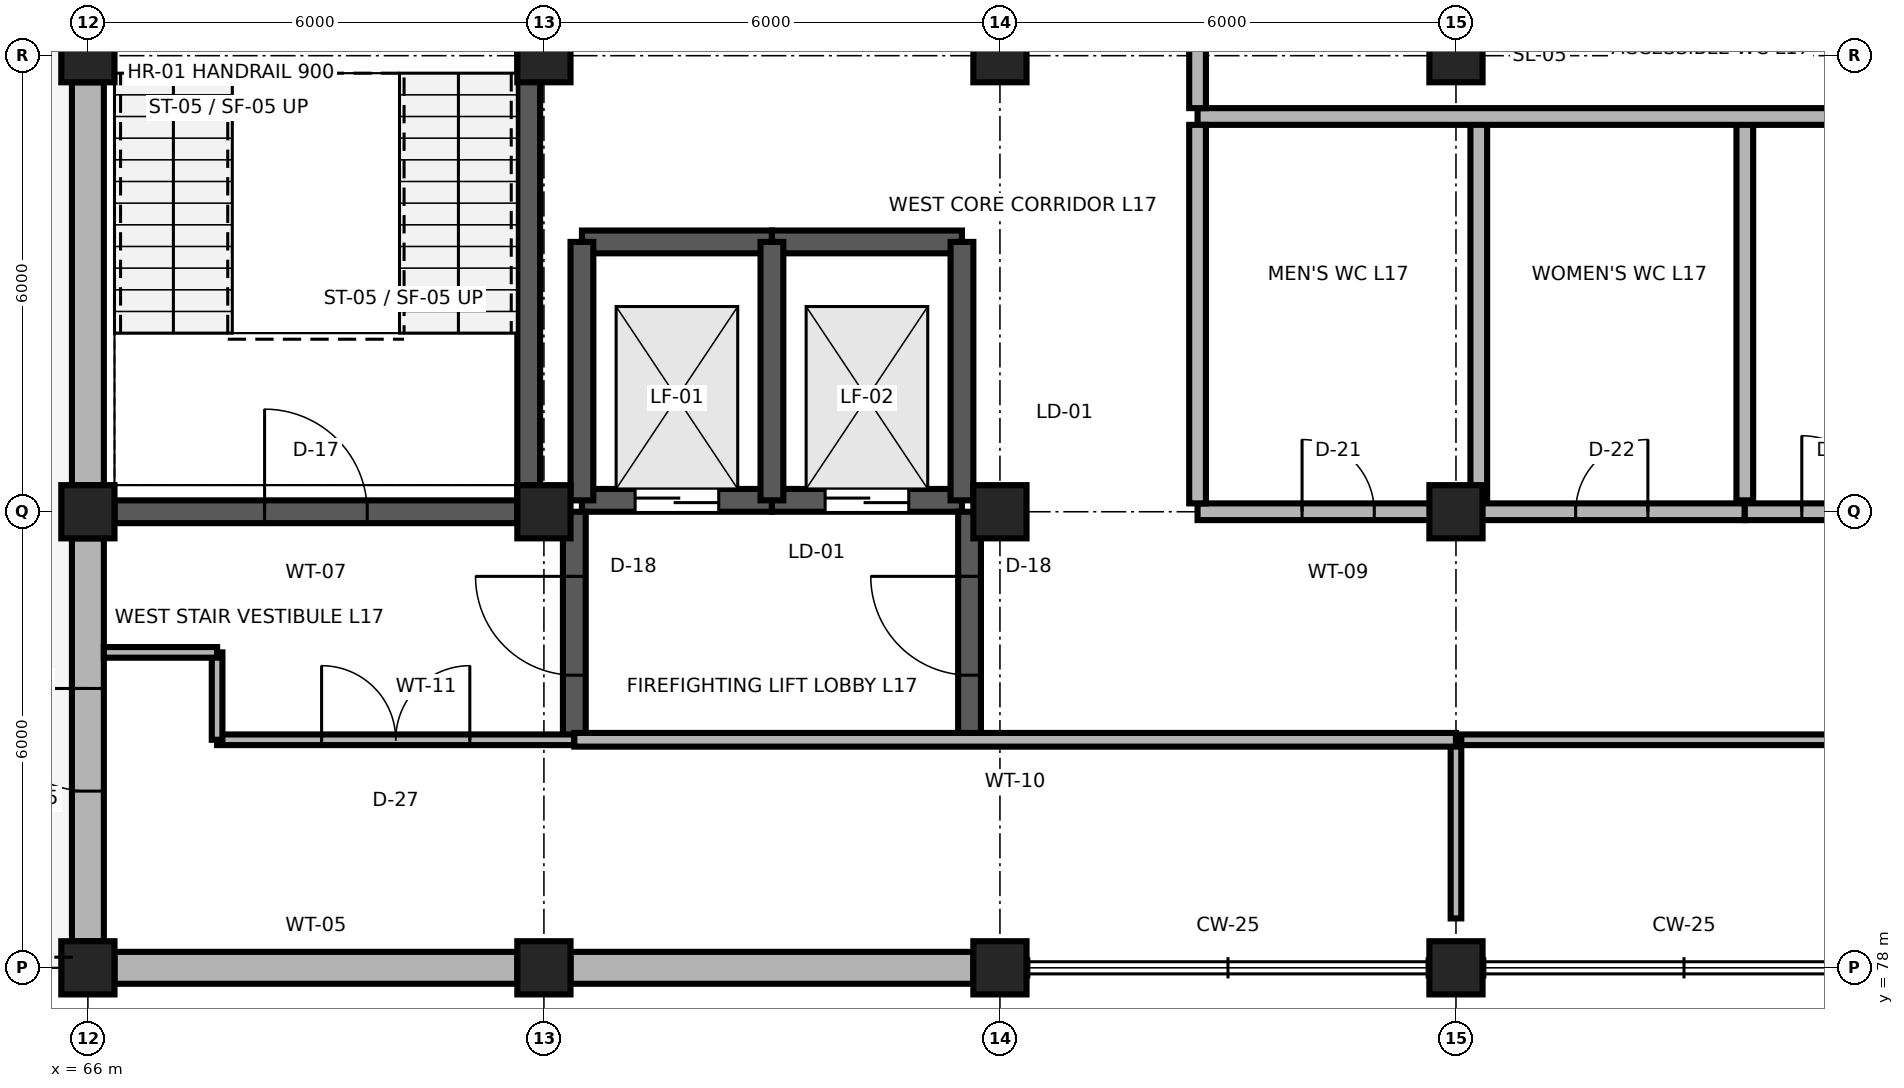
"""IFC4 building model, lengths in metres.
Left out: names, types, materials, properties, quantities, classifications, styles, units other than length and angle.
Written with IfcOpenShell. Run it as: python <this file> out.ifc"""

import sys

from ifc_helpers import new_model, si_unit, direction, frame, frame_2d, origin, origin_2d, place, context, subcontext, project, spatial, rectangle, extrude, element, fill, save


model = new_model("IFC4")
c1 = context("Model", 3, precision=1e-05, world=origin(), true_north=direction((0.0, 1.0)))
c2 = subcontext(c1, "Body", "Model", "MODEL_VIEW")
j1 = project(units=[si_unit("LENGTHUNIT", "METRE"), si_unit("PLANEANGLEUNIT", "RADIAN")], contexts=[c1])
p1 = place(None, origin())
s1 = spatial("IfcSite", under=j1, at=p1, CompositionType="ELEMENT")
p2 = place(p1, origin())
s2 = spatial("IfcBuilding", under=s1, at=p2, CompositionType="ELEMENT")
p3 = place(p2, frame((0.0, 0.0, 67.8)))
s3 = spatial("IfcBuildingStorey", under=s2, at=p3, CompositionType="ELEMENT", Elevation=67.8)
for number, where, z_axis, x_axis in (
    (1, (66.0, 78.0, 0.0), (0.0, 0.0, 1.0), (1.0, 0.0, 0.0)),
    (2, (72.0, 78.0, 0.0), (0.0, 0.0, 1.0), (1.0, 0.0, 0.0)),
    (3, (78.0, 78.0, 0.0), (0.0, 0.0, 1.0), (1.0, 0.0, 0.0)),
    (4, (84.0, 78.0, 0.0), (0.0, 0.0, 1.0), (1.0, 0.0, 0.0)),
    (5, (66.0, 84.0, 0.0), (0.0, 0.0, 1.0), (1.0, 0.0, 0.0)),
    (6, (72.0, 84.0, 0.0), (0.0, 0.0, 1.0), (1.0, 0.0, 0.0)),
    (7, (78.0, 84.0, 0.0), (0.0, 0.0, 1.0), (1.0, 0.0, 0.0)),
    (8, (84.0, 84.0, 0.0), (0.0, 0.0, 1.0), (1.0, 0.0, 0.0)),
    (9, (66.0, 90.0, 0.0), (0.0, 0.0, 1.0), (1.0, 0.0, 0.0)),
    (10, (72.0, 90.0, 0.0), (0.0, 0.0, 1.0), (1.0, 0.0, 0.0)),
    (11, (78.0, 90.0, 0.0), (0.0, 0.0, 1.0), (1.0, 0.0, 0.0)),
    (12, (84.0, 90.0, 0.0), (0.0, 0.0, 1.0), (1.0, 0.0, 0.0)),
):
    element("IfcColumn", number, at=place(p3, frame(where, z_axis=z_axis, x_axis=x_axis)), inside=s3, PredefinedType="COLUMN", context=c2, shape_type="SweptSolid", body=[
        extrude(rectangle(XDim=0.7, YDim=0.7, at=origin_2d()), origin(), (0.0, 0.0, 1.0), 4.2),
    ])
for number, where, z_axis, x_axis in (
    (13, (66.35, 78.0, 0.0), (0.0, 0.0, 1.0), (1.0, 0.0, 0.0)),
    (14, (72.35, 78.0, 0.0), (0.0, 0.0, 1.0), (1.0, 0.0, 0.0)),
):
    element("IfcWall", number, at=place(p3, frame(where, z_axis=z_axis, x_axis=x_axis)), inside=s3, PredefinedType="SOLIDWALL", context=c2, shape_type="SweptSolid", body=[
        extrude(rectangle(XDim=5.3, YDim=0.42, at=frame_2d((2.65, 0.0))), origin(), (0.0, 0.0, 1.0), 3.54),
    ])
p4 = place(p3, frame((66.0, 78.35, 0.0), z_axis=(0.0, 0.0, 1.0), x_axis=(0.0, 1.0, 0.0)))
e15 = element("IfcWall", 15, at=p4, inside=s3, PredefinedType="SOLIDWALL", context=c2, shape_type="SweptSolid", body=[
    extrude(rectangle(XDim=5.3, YDim=0.42, at=frame_2d((2.65, 0.0))), origin(), (0.0, 0.0, 1.0), 3.54),
])
p5 = place(p4, frame((1.975, 0.0, 0.0)))
e16 = element("IfcOpeningElement", 16, at=p5, cuts=e15, PredefinedType="OPENING", context=c2, shape_type="SweptSolid", body=[
    extrude(rectangle(XDim=1.35, YDim=2.35, at=frame_2d((0.675, 1.175))), frame((0.0, 0.225, 0.0), z_axis=(0.0, -1.0, 0.0), x_axis=(1.0, 0.0, 0.0)), (0.0, 0.0, 1.0), 0.45),
])
p6 = place(p3, frame((66.0, 84.35, 0.0), z_axis=(0.0, 0.0, 1.0), x_axis=(0.0, 1.0, 0.0)))
e17 = element("IfcWall", 17, at=p6, inside=s3, PredefinedType="SOLIDWALL", context=c2, shape_type="SweptSolid", body=[
    extrude(rectangle(XDim=5.3, YDim=0.42, at=frame_2d((2.65, 0.0))), origin(), (0.0, 0.0, 1.0), 3.54),
])
p7 = place(p3, frame((66.35, 84.0, 0.0), z_axis=(0.0, 0.0, 1.0), x_axis=(1.0, 0.0, 0.0)))
e18 = element("IfcWall", 18, at=p7, inside=s3, PredefinedType="SHEAR", context=c2, shape_type="SweptSolid", body=[
    extrude(rectangle(XDim=5.3, YDim=0.3, at=frame_2d((2.65, 0.0))), origin(), (0.0, 0.0, 1.0), 3.96),
])
p8 = place(p7, frame((1.975, 0.0, 0.0)))
e19 = element("IfcOpeningElement", 19, at=p8, cuts=e18, PredefinedType="OPENING", context=c2, shape_type="SweptSolid", body=[
    extrude(rectangle(XDim=1.35, YDim=2.2, at=frame_2d((0.675, 1.1))), frame((0.0, 0.165, 0.0), z_axis=(0.0, -1.0, 0.0), x_axis=(1.0, 0.0, 0.0)), (0.0, 0.0, 1.0), 0.33),
])
p9 = place(p3, frame((71.8, 84.0, 0.0), z_axis=(0.0, 0.0, 1.0), x_axis=(0.0, 1.0, 0.0)))
e20 = element("IfcWall", 20, at=p9, inside=s3, PredefinedType="SHEAR", context=c2, shape_type="SweptSolid", body=[
    extrude(rectangle(XDim=11.8, YDim=0.3, at=frame_2d((5.9, 0.0))), origin(), (0.0, 0.0, 1.0), 3.96),
])
p10 = place(p3, frame((72.5, 84.15, 0.0), z_axis=(0.0, 0.0, 1.0), x_axis=(1.0, 0.0, 0.0)))
e21 = element("IfcWall", 21, at=p10, inside=s3, PredefinedType="SHEAR", context=c2, shape_type="SweptSolid", body=[
    extrude(rectangle(XDim=2.5, YDim=0.3, at=frame_2d((1.25, 0.0))), origin(), (0.0, 0.0, 1.0), 3.96),
])
p11 = place(p10, frame((0.7, 0.0, 0.0)))
e22 = element("IfcOpeningElement", 22, at=p11, cuts=e21, PredefinedType="OPENING", context=c2, shape_type="SweptSolid", body=[
    extrude(rectangle(XDim=1.1, YDim=2.1, at=frame_2d((0.55, 1.05))), frame((0.0, 0.165, 0.0), z_axis=(0.0, -1.0, 0.0), x_axis=(1.0, 0.0, 0.0)), (0.0, 0.0, 1.0), 0.33),
])
p12 = place(p3, frame((72.5, 87.55, 0.0), z_axis=(0.0, 0.0, 1.0), x_axis=(1.0, 0.0, 0.0)))
e23 = element("IfcWall", 23, at=p12, inside=s3, PredefinedType="SHEAR", context=c2, shape_type="SweptSolid", body=[
    extrude(rectangle(XDim=2.5, YDim=0.3, at=frame_2d((1.25, 0.0))), origin(), (0.0, 0.0, 1.0), 3.96),
])
p13 = place(p3, frame((72.5, 84.15, 0.0), z_axis=(0.0, 0.0, 1.0), x_axis=(0.0, 1.0, 0.0)))
e24 = element("IfcWall", 24, at=p13, inside=s3, PredefinedType="SHEAR", context=c2, shape_type="SweptSolid", body=[
    extrude(rectangle(XDim=3.4, YDim=0.3, at=frame_2d((1.7, 0.0))), origin(), (0.0, 0.0, 1.0), 3.96),
])
p14 = place(p3, frame((75.0, 84.15, 0.0), z_axis=(0.0, 0.0, 1.0), x_axis=(1.0, 0.0, 0.0)))
e25 = element("IfcWall", 25, at=p14, inside=s3, PredefinedType="SHEAR", context=c2, shape_type="SweptSolid", body=[
    extrude(rectangle(XDim=2.5, YDim=0.3, at=frame_2d((1.25, 0.0))), origin(), (0.0, 0.0, 1.0), 3.96),
])
p15 = place(p14, frame((0.7, 0.0, 0.0)))
e26 = element("IfcOpeningElement", 26, at=p15, cuts=e25, PredefinedType="OPENING", context=c2, shape_type="SweptSolid", body=[
    extrude(rectangle(XDim=1.1, YDim=2.1, at=frame_2d((0.55, 1.05))), frame((0.0, 0.165, 0.0), z_axis=(0.0, -1.0, 0.0), x_axis=(1.0, 0.0, 0.0)), (0.0, 0.0, 1.0), 0.33),
])
p16 = place(p3, frame((75.0, 87.55, 0.0), z_axis=(0.0, 0.0, 1.0), x_axis=(1.0, 0.0, 0.0)))
e27 = element("IfcWall", 27, at=p16, inside=s3, PredefinedType="SHEAR", context=c2, shape_type="SweptSolid", body=[
    extrude(rectangle(XDim=2.5, YDim=0.3, at=frame_2d((1.25, 0.0))), origin(), (0.0, 0.0, 1.0), 3.96),
])
for number, where, z_axis, x_axis in (
    (28, (75.0, 84.15, 0.0), (0.0, 0.0, 1.0), (0.0, 1.0, 0.0)),
    (29, (77.5, 84.15, 0.0), (0.0, 0.0, 1.0), (0.0, 1.0, 0.0)),
):
    element("IfcWall", number, at=place(p3, frame(where, z_axis=z_axis, x_axis=x_axis)), inside=s3, PredefinedType="SHEAR", context=c2, shape_type="SweptSolid", body=[
        extrude(rectangle(XDim=3.4, YDim=0.3, at=frame_2d((1.7, 0.0))), origin(), (0.0, 0.0, 1.0), 3.96),
    ])
p17 = place(p3, frame((72.4, 81.0, 0.0), z_axis=(0.0, 0.0, 1.0), x_axis=(0.0, 1.0, 0.0)))
e30 = element("IfcWall", 30, at=p17, inside=s3, PredefinedType="SHEAR", context=c2, shape_type="SweptSolid", body=[
    extrude(rectangle(XDim=3.0, YDim=0.3, at=frame_2d((1.5, 0.0))), origin(), (0.0, 0.0, 1.0), 3.96),
])
p18 = place(p17, frame((0.85, 0.0, 0.0)))
e31 = element("IfcOpeningElement", 31, at=p18, cuts=e30, PredefinedType="OPENING", context=c2, shape_type="SweptSolid", body=[
    extrude(rectangle(XDim=1.3, YDim=2.2, at=frame_2d((0.65, 1.1))), frame((0.0, 0.165, 0.0), z_axis=(0.0, -1.0, 0.0), x_axis=(1.0, 0.0, 0.0)), (0.0, 0.0, 1.0), 0.33),
])
p19 = place(p3, frame((77.6, 81.0, 0.0), z_axis=(0.0, 0.0, 1.0), x_axis=(0.0, 1.0, 0.0)))
e32 = element("IfcWall", 32, at=p19, inside=s3, PredefinedType="SHEAR", context=c2, shape_type="SweptSolid", body=[
    extrude(rectangle(XDim=3.0, YDim=0.3, at=frame_2d((1.5, 0.0))), origin(), (0.0, 0.0, 1.0), 3.96),
])
p20 = place(p19, frame((0.85, 0.0, 0.0)))
e33 = element("IfcOpeningElement", 33, at=p20, cuts=e32, PredefinedType="OPENING", context=c2, shape_type="SweptSolid", body=[
    extrude(rectangle(XDim=1.3, YDim=2.2, at=frame_2d((0.65, 1.1))), frame((0.0, 0.165, 0.0), z_axis=(0.0, -1.0, 0.0), x_axis=(1.0, 0.0, 0.0)), (0.0, 0.0, 1.0), 0.33),
])
p21 = place(p3, frame((80.6, 84.0, 0.0), z_axis=(0.0, 0.0, 1.0), x_axis=(1.0, 0.0, 0.0)))
e34 = element("IfcWall", 34, at=p21, inside=s3, PredefinedType="PARTITIONING", context=c2, shape_type="SweptSolid", body=[
    extrude(rectangle(XDim=3.7, YDim=0.22, at=frame_2d((1.85, 0.0))), origin(), (0.0, 0.0, 1.0), 3.716),
])
p22 = place(p21, frame((1.375, 0.0, 0.0)))
e35 = element("IfcOpeningElement", 35, at=p22, cuts=e34, PredefinedType="OPENING", context=c2, shape_type="SweptSolid", body=[
    extrude(rectangle(XDim=0.95, YDim=2.15, at=frame_2d((0.475, 1.075))), frame((0.0, 0.125, 0.0), z_axis=(0.0, -1.0, 0.0), x_axis=(1.0, 0.0, 0.0)), (0.0, 0.0, 1.0), 0.25),
])
p23 = place(p3, frame((84.3, 84.0, 0.0), z_axis=(0.0, 0.0, 1.0), x_axis=(1.0, 0.0, 0.0)))
e36 = element("IfcWall", 36, at=p23, inside=s3, PredefinedType="PARTITIONING", context=c2, shape_type="SweptSolid", body=[
    extrude(rectangle(XDim=3.5, YDim=0.22, at=frame_2d((1.75, 0.0))), origin(), (0.0, 0.0, 1.0), 3.716),
])
p24 = place(p23, frame((1.275, 0.0, 0.0)))
e37 = element("IfcOpeningElement", 37, at=p24, cuts=e36, PredefinedType="OPENING", context=c2, shape_type="SweptSolid", body=[
    extrude(rectangle(XDim=0.95, YDim=2.1, at=frame_2d((0.475, 1.05))), frame((0.0, 0.125, 0.0), z_axis=(0.0, -1.0, 0.0), x_axis=(1.0, 0.0, 0.0)), (0.0, 0.0, 1.0), 0.25),
])
p25 = place(p3, frame((87.8, 84.0, 0.0), z_axis=(0.0, 0.0, 1.0), x_axis=(1.0, 0.0, 0.0)))
e38 = element("IfcWall", 38, at=p25, inside=s3, PredefinedType="PARTITIONING", context=c2, shape_type="SweptSolid", body=[
    extrude(rectangle(XDim=2.5, YDim=0.22, at=frame_2d((1.25, 0.0))), origin(), (0.0, 0.0, 1.0), 3.716),
])
p26 = place(p25, frame((0.75, 0.0, 0.0)))
e39 = element("IfcOpeningElement", 39, at=p26, cuts=e38, PredefinedType="OPENING", context=c2, shape_type="SweptSolid", body=[
    extrude(rectangle(XDim=1.0, YDim=2.15, at=frame_2d((0.5, 1.075))), frame((0.0, 0.125, 0.0), z_axis=(0.0, -1.0, 0.0), x_axis=(1.0, 0.0, 0.0)), (0.0, 0.0, 1.0), 0.25),
])
for number, where, z_axis, x_axis in (
    (40, (84.3, 84.15, 0.0), (0.0, 0.0, 1.0), (0.0, 1.0, 0.0)),
    (41, (87.8, 84.15, 0.0), (0.0, 0.0, 1.0), (0.0, 1.0, 0.0)),
):
    element("IfcWall", number, at=place(p3, frame(where, z_axis=z_axis, x_axis=x_axis)), inside=s3, PredefinedType="PARTITIONING", context=c2, shape_type="SweptSolid", body=[
        extrude(rectangle(XDim=5.0, YDim=0.22, at=frame_2d((2.5, 0.0))), origin(), (0.0, 0.0, 1.0), 3.96),
    ])
p27 = place(p3, frame((80.6, 89.2, 0.0), z_axis=(0.0, 0.0, 1.0), x_axis=(1.0, 0.0, 0.0)))
e42 = element("IfcWall", 42, at=p27, inside=s3, PredefinedType="PARTITIONING", context=c2, shape_type="SweptSolid", body=[
    extrude(rectangle(XDim=9.87, YDim=0.22, at=frame_2d((4.935, 0.0))), origin(), (0.0, 0.0, 1.0), 3.96),
])
p28 = place(p3, frame((67.7, 81.0, 0.0), z_axis=(0.0, 0.0, 1.0), x_axis=(1.0, 0.0, 0.0)))
e43 = element("IfcWall", 43, at=p28, inside=s3, PredefinedType="PARTITIONING", context=c2, shape_type="SweptSolid", body=[
    extrude(rectangle(XDim=4.7, YDim=0.14, at=frame_2d((2.35, 0.0))), origin(), (0.0, 0.0, 1.0), 3.96),
])
p29 = place(p28, frame((1.375, 0.0, 0.0)))
e44 = element("IfcOpeningElement", 44, at=p29, cuts=e43, PredefinedType="OPENING", context=c2, shape_type="SweptSolid", body=[
    extrude(rectangle(XDim=1.95, YDim=2.8, at=frame_2d((0.975, 1.4))), frame((0.0, 0.085, 0.0), z_axis=(0.0, -1.0, 0.0), x_axis=(1.0, 0.0, 0.0)), (0.0, 0.0, 1.0), 0.17),
])
p30 = place(p3, frame((84.0, 81.0, 0.0), z_axis=(0.0, 0.0, 1.0), x_axis=(1.0, 0.0, 0.0)))
e45 = element("IfcWall", 45, at=p30, inside=s3, PredefinedType="PARTITIONING", context=c2, shape_type="SweptSolid", body=[
    extrude(rectangle(XDim=12.0, YDim=0.14, at=frame_2d((6.0, 0.0))), origin(), (0.0, 0.0, 1.0), 3.96),
])
p31 = place(p30, frame((5.15, 0.0, 0.0)))
e46 = element("IfcOpeningElement", 46, at=p31, cuts=e45, PredefinedType="OPENING", context=c2, shape_type="SweptSolid", body=[
    extrude(rectangle(XDim=1.7, YDim=2.45, at=frame_2d((0.85, 1.225))), frame((0.0, 0.085, 0.0), z_axis=(0.0, -1.0, 0.0), x_axis=(1.0, 0.0, 0.0)), (0.0, 0.0, 1.0), 0.17),
])
p32 = place(p3, frame((84.0, 78.65, 0.0), z_axis=(0.0, 0.0, 1.0), x_axis=(0.0, 1.0, 0.0)))
e47 = element("IfcWall", 47, at=p32, inside=s3, PredefinedType="PARTITIONING", context=c2, shape_type="SweptSolid", body=[
    extrude(rectangle(XDim=2.35, YDim=0.14, at=frame_2d((1.175, 0.0))), origin(), (0.0, 0.0, 1.0), 3.716),
])
p33 = place(p3, frame((80.6, 84.11, 0.0), z_axis=(0.0, 0.0, 1.0), x_axis=(0.0, 1.0, 0.0)))
e48 = element("IfcWall", 48, at=p33, inside=s3, PredefinedType="PARTITIONING", context=c2, shape_type="SweptSolid", body=[
    extrude(rectangle(XDim=4.98, YDim=0.22, at=frame_2d((2.49, 0.0))), origin(), (0.0, 0.0, 1.0), 3.96),
])
p34 = place(p3, frame((80.6, 89.31, 0.0), z_axis=(0.0, 0.0, 1.0), x_axis=(0.0, 1.0, 0.0)))
e49 = element("IfcWall", 49, at=p34, inside=s3, PredefinedType="PARTITIONING", context=c2, shape_type="SweptSolid", body=[
    extrude(rectangle(XDim=2.99, YDim=0.22, at=frame_2d((1.495, 0.0))), origin(), (0.0, 0.0, 1.0), 3.96),
])
p35 = place(p3, frame((72.4, 81.0, 0.0), z_axis=(0.0, 0.0, 1.0), x_axis=(1.0, 0.0, 0.0)))
e50 = element("IfcWall", 50, at=p35, inside=s3, PredefinedType="PARTITIONING", context=c2, shape_type="SweptSolid", body=[
    extrude(rectangle(XDim=11.6, YDim=0.18, at=frame_2d((5.8, 0.0))), origin(), (0.0, 0.0, 1.0), 3.96),
])
p36 = place(p3, frame((67.7, 81.0, 0.0), z_axis=(0.0, 0.0, 1.0), x_axis=(0.0, 1.0, 0.0)))
e51 = element("IfcWall", 51, at=p36, inside=s3, PredefinedType="PARTITIONING", context=c2, shape_type="SweptSolid", body=[
    extrude(rectangle(XDim=1.15, YDim=0.14, at=frame_2d((0.575, 0.0))), origin(), (0.0, 0.0, 1.0), 3.96),
])
p37 = place(p3, frame((67.7, 82.15, 0.0), z_axis=(0.0, 0.0, 1.0), x_axis=(-1.0, 0.0, 0.0)))
e52 = element("IfcWall", 52, at=p37, inside=s3, PredefinedType="PARTITIONING", context=c2, shape_type="SweptSolid", body=[
    extrude(rectangle(XDim=1.49, YDim=0.14, at=frame_2d((0.745, 0.0))), origin(), (0.0, 0.0, 1.0), 3.96),
])
p38 = place(p5, origin())
e53 = element("IfcDoor", 53, at=p38, inside=s3, OperationType="SINGLE_SWING_RIGHT", PredefinedType="DOOR", context=c2, shape_type="SweptSolid", body=[
    extrude(rectangle(XDim=1.35, YDim=2.35, at=frame_2d((0.675, 1.175))), frame((0.0, 0.025, 0.0), z_axis=(0.0, -1.0, 0.0), x_axis=(1.0, 0.0, 0.0)), (0.0, 0.0, 1.0), 0.05),
])
fill(e16, e53)
p39 = place(p8, origin())
e54 = element("IfcDoor", 54, at=p39, inside=s3, OperationType="SINGLE_SWING_LEFT", PredefinedType="DOOR", context=c2, shape_type="SweptSolid", body=[
    extrude(rectangle(XDim=1.35, YDim=2.2, at=frame_2d((0.675, 1.1))), frame((0.0, 0.025, 0.0), z_axis=(0.0, -1.0, 0.0), x_axis=(1.0, 0.0, 0.0)), (0.0, 0.0, 1.0), 0.05),
])
fill(e19, e54)
p40 = place(p11, origin())
e55 = element("IfcDoor", 55, at=p40, inside=s3, OperationType="DOUBLE_DOOR_SLIDING", PredefinedType="DOOR", context=c2, shape_type="SweptSolid", body=[
    extrude(rectangle(XDim=1.1, YDim=2.1, at=frame_2d((0.55, 1.05))), frame((0.0, 0.025, 0.0), z_axis=(0.0, -1.0, 0.0), x_axis=(1.0, 0.0, 0.0)), (0.0, 0.0, 1.0), 0.05),
])
fill(e22, e55)
p41 = place(p15, origin())
e56 = element("IfcDoor", 56, at=p41, inside=s3, OperationType="DOUBLE_DOOR_SLIDING", PredefinedType="DOOR", context=c2, shape_type="SweptSolid", body=[
    extrude(rectangle(XDim=1.1, YDim=2.1, at=frame_2d((0.55, 1.05))), frame((0.0, 0.025, 0.0), z_axis=(0.0, -1.0, 0.0), x_axis=(1.0, 0.0, 0.0)), (0.0, 0.0, 1.0), 0.05),
])
fill(e26, e56)
p42 = place(p18, origin())
e57 = element("IfcDoor", 57, at=p42, inside=s3, OperationType="SINGLE_SWING_RIGHT", PredefinedType="DOOR", context=c2, shape_type="SweptSolid", body=[
    extrude(rectangle(XDim=1.3, YDim=2.2, at=frame_2d((0.65, 1.1))), frame((0.0, 0.025, 0.0), z_axis=(0.0, -1.0, 0.0), x_axis=(1.0, 0.0, 0.0)), (0.0, 0.0, 1.0), 0.05),
])
fill(e31, e57)
p43 = place(p20, origin())
e58 = element("IfcDoor", 58, at=p43, inside=s3, OperationType="SINGLE_SWING_RIGHT", PredefinedType="DOOR", context=c2, shape_type="SweptSolid", body=[
    extrude(rectangle(XDim=1.3, YDim=2.2, at=frame_2d((0.65, 1.1))), frame((0.0, 0.025, 0.0), z_axis=(0.0, -1.0, 0.0), x_axis=(1.0, 0.0, 0.0)), (0.0, 0.0, 1.0), 0.05),
])
fill(e33, e58)
p44 = place(p22, origin())
e59 = element("IfcDoor", 59, at=p44, inside=s3, OperationType="SINGLE_SWING_LEFT", PredefinedType="DOOR", context=c2, shape_type="SweptSolid", body=[
    extrude(rectangle(XDim=0.95, YDim=2.15, at=frame_2d((0.475, 1.075))), frame((0.0, 0.025, 0.0), z_axis=(0.0, -1.0, 0.0), x_axis=(1.0, 0.0, 0.0)), (0.0, 0.0, 1.0), 0.05),
])
fill(e35, e59)
p45 = place(p24, origin())
e60 = element("IfcDoor", 60, at=p45, inside=s3, OperationType="SINGLE_SWING_RIGHT", PredefinedType="DOOR", context=c2, shape_type="SweptSolid", body=[
    extrude(rectangle(XDim=0.95, YDim=2.1, at=frame_2d((0.475, 1.05))), frame((0.0, 0.025, 0.0), z_axis=(0.0, -1.0, 0.0), x_axis=(1.0, 0.0, 0.0)), (0.0, 0.0, 1.0), 0.05),
])
fill(e37, e60)
p46 = place(p26, origin())
e61 = element("IfcDoor", 61, at=p46, inside=s3, OperationType="SINGLE_SWING_LEFT", PredefinedType="DOOR", context=c2, shape_type="SweptSolid", body=[
    extrude(rectangle(XDim=1.0, YDim=2.15, at=frame_2d((0.5, 1.075))), frame((0.0, 0.025, 0.0), z_axis=(0.0, -1.0, 0.0), x_axis=(1.0, 0.0, 0.0)), (0.0, 0.0, 1.0), 0.05),
])
fill(e39, e61)
p47 = place(p29, origin())
e62 = element("IfcDoor", 62, at=p47, inside=s3, OperationType="DOUBLE_DOOR_SINGLE_SWING", PredefinedType="DOOR", context=c2, shape_type="SweptSolid", body=[
    extrude(rectangle(XDim=1.95, YDim=2.8, at=frame_2d((0.975, 1.4))), frame((0.0, 0.025, 0.0), z_axis=(0.0, -1.0, 0.0), x_axis=(1.0, 0.0, 0.0)), (0.0, 0.0, 1.0), 0.05),
])
fill(e44, e62)
save(model, sys.argv[1])
